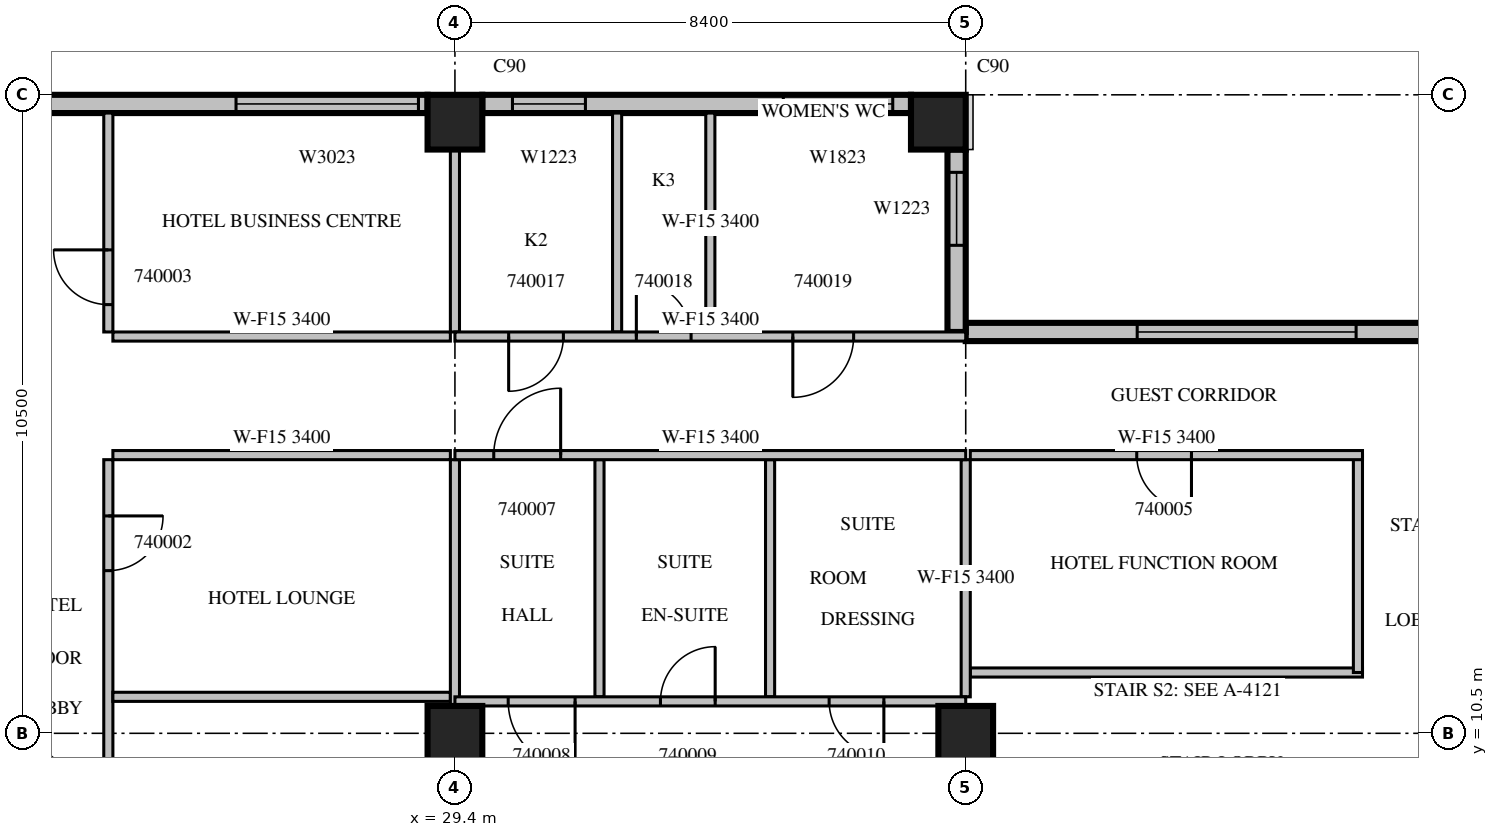
"""IFC4 building model, lengths in metres.
Left out: names, types, materials, properties, quantities, classifications, styles, units other than length and angle.
Written with IfcOpenShell. Run it as: python <this file> out.ifc"""

import sys

from ifc_helpers import new_model, si_unit, direction, frame, frame_2d, origin, origin_2d, place, context, subcontext, project, spatial, rectangle, extrude, source, transform, mapped, element, fill, save


model = new_model("IFC4")
c1 = context("Model", 3, precision=1e-05, world=origin(), true_north=direction((0.0, 1.0)))
c2 = subcontext(c1, "Body", "Model", "MODEL_VIEW")
j1 = project(units=[si_unit("LENGTHUNIT", "METRE"), si_unit("PLANEANGLEUNIT", "RADIAN")], contexts=[c1])
p1 = place(None, origin())
s1 = spatial("IfcSite", under=j1, at=p1, CompositionType="ELEMENT")
p2 = place(p1, origin())
s2 = spatial("IfcBuilding", under=s1, at=p2, CompositionType="ELEMENT")
p3 = place(p2, frame((0.0, 0.0, 185.4)))
s3 = spatial("IfcBuildingStorey", under=s2, at=p3, CompositionType="ELEMENT", Elevation=185.4)
m1 = source(origin(), c2, "Body", "SweptSolid", [
    extrude(rectangle(XDim=0.9, YDim=0.9, at=origin_2d()), origin(), (0.0, 0.0, 1.0), 3.8),
])
for number, where, z_axis, x_axis in (
    (1, (29.4, 10.5, 0.0), (0.0, 0.0, 1.0), (1.0, 0.0, 0.0)),
    (2, (37.8, 10.5, 0.0), (0.0, 0.0, 1.0), (1.0, 0.0, 0.0)),
    (3, (29.4, 20.55, 0.0), (0.0, 0.0, 1.0), (1.0, 0.0, 0.0)),
    (4, (37.35, 20.55, 0.0), (0.0, 0.0, 1.0), (1.0, 0.0, 0.0)),
):
    element("IfcColumn", number, at=place(p3, frame(where, z_axis=z_axis, x_axis=x_axis)), inside=s3, PredefinedType="COLUMN", context=c2, shape_type="MappedRepresentation", body=[
        mapped(m1, transform((0.0, 0.0, 0.0), scale=1.0)),
    ])
m2 = source(origin(), c2, "Body", "SweptSolid", [
    extrude(rectangle(XDim=21.84, YDim=0.3, at=frame_2d((10.92, 0.0))), origin(), (0.0, 0.0, 1.0), 3.4),
])
p4 = place(p3, frame((59.64, 17.1, 0.0), z_axis=(0.0, 0.0, 1.0), x_axis=(-1.0, 0.0, 0.0)))
e5 = element("IfcWall", 5, at=p4, inside=s3, PredefinedType="STANDARD", context=c2, shape_type="MappedRepresentation", body=[
    mapped(m2, transform((0.0, 0.0, 0.0), scale=1.0)),
])
m3 = source(origin(), c2, "Body", "SweptSolid", [
    extrude(rectangle(XDim=3.0, YDim=2.3, at=frame_2d((1.5, 1.15))), frame((0.0, 0.16, 0.0), z_axis=(0.0, -1.0, 0.0), x_axis=(1.0, 0.0, 0.0)), (0.0, 0.0, 1.0), 0.32),
])
p5 = place(p4, frame((0.6, 0.0, 0.6)))
e6 = element("IfcOpeningElement", 6, at=p5, cuts=e5, PredefinedType="OPENING", context=c2, shape_type="MappedRepresentation", body=[
    mapped(m3, transform((0.0, 0.0, 0.0), scale=1.0)),
])
p6 = place(p4, frame((4.8, 0.0, 0.6)))
e7 = element("IfcOpeningElement", 7, at=p6, cuts=e5, PredefinedType="OPENING", context=c2, shape_type="MappedRepresentation", body=[
    mapped(m3, transform((0.0, 0.0, 0.0), scale=1.0)),
])
m4 = source(origin(), c2, "Body", "SweptSolid", [
    extrude(rectangle(XDim=3.6, YDim=2.3, at=frame_2d((1.8, 1.15))), frame((0.0, 0.16, 0.0), z_axis=(0.0, -1.0, 0.0), x_axis=(1.0, 0.0, 0.0)), (0.0, 0.0, 1.0), 0.32),
])
p7 = place(p4, frame((9.54, 0.0, 0.6)))
e8 = element("IfcOpeningElement", 8, at=p7, cuts=e5, PredefinedType="OPENING", context=c2, shape_type="MappedRepresentation", body=[
    mapped(m4, transform((0.0, 0.0, 0.0), scale=1.0)),
])
p8 = place(p4, frame((15.42, 0.0, 0.6)))
e9 = element("IfcOpeningElement", 9, at=p8, cuts=e5, PredefinedType="OPENING", context=c2, shape_type="MappedRepresentation", body=[
    mapped(m4, transform((0.0, 0.0, 0.0), scale=1.0)),
])
m5 = source(origin(), c2, "Body", "SweptSolid", [
    extrude(rectangle(XDim=3.0, YDim=0.3, at=frame_2d((1.5, 0.0))), origin(), (0.0, 0.0, 1.0), 3.4),
])
p9 = place(p3, frame((37.65, 17.1, 0.0), z_axis=(0.0, 0.0, 1.0), x_axis=(0.0, 1.0, 0.0)))
e10 = element("IfcWall", 10, at=p9, inside=s3, PredefinedType="STANDARD", context=c2, shape_type="MappedRepresentation", body=[
    mapped(m5, transform((0.0, 0.0, 0.0), scale=1.0)),
])
m6 = source(origin(), c2, "Body", "SweptSolid", [
    extrude(rectangle(XDim=1.2, YDim=2.3, at=frame_2d((0.6, 1.15))), frame((0.0, 0.16, 0.0), z_axis=(0.0, -1.0, 0.0), x_axis=(1.0, 0.0, 0.0)), (0.0, 0.0, 1.0), 0.32),
])
p10 = place(p9, frame((1.425, 0.0, 0.6)))
e11 = element("IfcOpeningElement", 11, at=p10, cuts=e10, PredefinedType="OPENING", context=c2, shape_type="MappedRepresentation", body=[
    mapped(m6, transform((0.0, 0.0, 0.0), scale=1.0)),
])
m7 = source(origin(), c2, "Body", "SweptSolid", [
    extrude(rectangle(XDim=7.05, YDim=0.3, at=frame_2d((3.525, 0.0))), origin(), (0.0, 0.0, 1.0), 3.4),
])
p11 = place(p3, frame((36.9, 20.85, 0.0), z_axis=(0.0, 0.0, 1.0), x_axis=(-1.0, 0.0, 0.0)))
e12 = element("IfcWall", 12, at=p11, inside=s3, PredefinedType="STANDARD", context=c2, shape_type="MappedRepresentation", body=[
    mapped(m7, transform((0.0, 0.0, 0.0), scale=1.0)),
])
m8 = source(origin(), c2, "Body", "SweptSolid", [
    extrude(rectangle(XDim=1.8, YDim=2.3, at=frame_2d((0.9, 1.15))), frame((0.0, 0.16, 0.0), z_axis=(0.0, -1.0, 0.0), x_axis=(1.0, 0.0, 0.0)), (0.0, 0.0, 1.0), 0.32),
])
p12 = place(p11, frame((0.3, 0.0, 0.6)))
e13 = element("IfcOpeningElement", 13, at=p12, cuts=e12, PredefinedType="OPENING", context=c2, shape_type="MappedRepresentation", body=[
    mapped(m8, transform((0.0, 0.0, 0.0), scale=1.0)),
])
p13 = place(p11, frame((5.354, 0.0, 0.6)))
e14 = element("IfcOpeningElement", 14, at=p13, cuts=e12, PredefinedType="OPENING", context=c2, shape_type="MappedRepresentation", body=[
    mapped(m6, transform((0.0, 0.0, 0.0), scale=1.0)),
])
m9 = source(origin(), c2, "Body", "SweptSolid", [
    extrude(rectangle(XDim=7.15, YDim=0.3, at=frame_2d((3.575, 0.0))), origin(), (0.0, 0.0, 1.0), 3.4),
])
p14 = place(p3, frame((28.95, 20.85, 0.0), z_axis=(0.0, 0.0, 1.0), x_axis=(-1.0, 0.0, 0.0)))
e15 = element("IfcWall", 15, at=p14, inside=s3, PredefinedType="STANDARD", context=c2, shape_type="MappedRepresentation", body=[
    mapped(m9, transform((0.0, 0.0, 0.0), scale=1.0)),
])
p15 = place(p14, frame((0.15, 0.0, 0.6)))
e16 = element("IfcOpeningElement", 16, at=p15, cuts=e15, PredefinedType="OPENING", context=c2, shape_type="MappedRepresentation", body=[
    mapped(m3, transform((0.0, 0.0, 0.0), scale=1.0)),
])
m10 = source(origin(), c2, "Body", "SweptSolid", [
    extrude(rectangle(XDim=11.525, YDim=0.15, at=frame_2d((5.763, 0.0))), origin(), (0.0, 0.0, 1.0), 3.4),
])
p16 = place(p3, frame((23.7, 15.0, 0.0), z_axis=(0.0, 0.0, 1.0), x_axis=(0.0, -1.0, 0.0)))
e17 = element("IfcWall", 17, at=p16, inside=s3, PredefinedType="PARTITIONING", context=c2, shape_type="MappedRepresentation", body=[
    mapped(m10, transform((0.0, 0.0, 0.0), scale=1.0)),
])
m11 = source(origin(), c2, "Body", "SweptSolid", [
    extrude(rectangle(XDim=0.9, YDim=2.1, at=frame_2d((0.45, 1.05))), frame((0.0, 0.085, 0.0), z_axis=(0.0, -1.0, 0.0), x_axis=(1.0, 0.0, 0.0)), (0.0, 0.0, 1.0), 0.17),
])
p17 = place(p16, frame((7.562, 0.0, 0.0)))
e18 = element("IfcOpeningElement", 18, at=p17, cuts=e17, PredefinedType="OPENING", context=c2, shape_type="MappedRepresentation", body=[
    mapped(m11, transform((0.0, 0.0, 0.0), scale=1.0)),
])
p18 = place(p16, frame((0.925, 0.0, 0.0)))
e19 = element("IfcOpeningElement", 19, at=p18, cuts=e17, PredefinedType="OPENING", context=c2, shape_type="MappedRepresentation", body=[
    mapped(m11, transform((0.0, 0.0, 0.0), scale=1.0)),
])
m12 = source(origin(), c2, "Body", "SweptSolid", [
    extrude(rectangle(XDim=3.6, YDim=0.15, at=frame_2d((1.8, 0.0))), origin(), (0.0, 0.0, 1.0), 3.4),
])
p19 = place(p3, frame((23.7, 20.7, 0.0), z_axis=(0.0, 0.0, 1.0), x_axis=(0.0, -1.0, 0.0)))
e20 = element("IfcWall", 20, at=p19, inside=s3, PredefinedType="PARTITIONING", context=c2, shape_type="MappedRepresentation", body=[
    mapped(m12, transform((0.0, 0.0, 0.0), scale=1.0)),
])
p20 = place(p19, frame((2.25, 0.0, 0.0)))
e21 = element("IfcOpeningElement", 21, at=p20, cuts=e20, PredefinedType="OPENING", context=c2, shape_type="MappedRepresentation", body=[
    mapped(m11, transform((0.0, 0.0, 0.0), scale=1.0)),
])
m13 = source(origin(), c2, "Body", "SweptSolid", [
    extrude(rectangle(XDim=5.55, YDim=0.15, at=frame_2d((2.775, 0.0))), origin(), (0.0, 0.0, 1.0), 3.4),
])
for number, where, z_axis, x_axis in (
    (22, (29.325, 11.1, 0.0), (0.0, 0.0, 1.0), (-1.0, 0.0, 0.0)),
    (23, (29.325, 15.075, 0.0), (0.0, 0.0, 1.0), (-1.0, 0.0, 0.0)),
    (24, (23.775, 17.025, 0.0), (0.0, 0.0, 1.0), (1.0, 0.0, 0.0)),
):
    element("IfcWall", number, at=place(p3, frame(where, z_axis=z_axis, x_axis=x_axis)), inside=s3, PredefinedType="PARTITIONING", context=c2, shape_type="MappedRepresentation", body=[
        mapped(m13, transform((0.0, 0.0, 0.0), scale=1.0)),
    ])
m14 = source(origin(), c2, "Body", "SweptSolid", [
    extrude(rectangle(XDim=4.051, YDim=0.15, at=frame_2d((2.026, 0.0))), origin(), (0.0, 0.0, 1.0), 3.4),
])
p21 = place(p3, frame((29.4, 10.949, 0.0), z_axis=(0.0, 0.0, 1.0), x_axis=(0.0, 1.0, 0.0)))
e25 = element("IfcWall", 25, at=p21, inside=s3, PredefinedType="PARTITIONING", context=c2, shape_type="MappedRepresentation", body=[
    mapped(m14, transform((0.0, 0.0, 0.0), scale=1.0)),
])
m15 = source(origin(), c2, "Body", "SweptSolid", [
    extrude(rectangle(XDim=3.001, YDim=0.15, at=frame_2d((1.5, 0.0))), origin(), (0.0, 0.0, 1.0), 3.4),
])
p22 = place(p3, frame((29.4, 17.1, 0.0), z_axis=(0.0, 0.0, 1.0), x_axis=(0.0, 1.0, 0.0)))
e26 = element("IfcWall", 26, at=p22, inside=s3, PredefinedType="PARTITIONING", context=c2, shape_type="MappedRepresentation", body=[
    mapped(m15, transform((0.0, 0.0, 0.0), scale=1.0)),
])
m16 = source(origin(), c2, "Body", "SweptSolid", [
    extrude(rectangle(XDim=6.45, YDim=0.15, at=frame_2d((3.225, 0.0))), origin(), (0.0, 0.0, 1.0), 3.4),
])
p23 = place(p3, frame((37.875, 11.5, 0.0), z_axis=(0.0, 0.0, 1.0), x_axis=(1.0, 0.0, 0.0)))
e27 = element("IfcWall", 27, at=p23, inside=s3, PredefinedType="PARTITIONING", context=c2, shape_type="MappedRepresentation", body=[
    mapped(m16, transform((0.0, 0.0, 0.0), scale=1.0)),
])
m17 = source(origin(), c2, "Body", "SweptSolid", [
    extrude(rectangle(XDim=3.575, YDim=0.15, at=frame_2d((1.788, 0.0))), origin(), (0.0, 0.0, 1.0), 3.4),
])
p24 = place(p3, frame((44.25, 11.5, 0.0), z_axis=(0.0, 0.0, 1.0), x_axis=(0.0, 1.0, 0.0)))
e28 = element("IfcWall", 28, at=p24, inside=s3, PredefinedType="PARTITIONING", context=c2, shape_type="MappedRepresentation", body=[
    mapped(m17, transform((0.0, 0.0, 0.0), scale=1.0)),
])
p25 = place(p3, frame((44.325, 15.075, 0.0), z_axis=(0.0, 0.0, 1.0), x_axis=(-1.0, 0.0, 0.0)))
e29 = element("IfcWall", 29, at=p25, inside=s3, PredefinedType="PARTITIONING", context=c2, shape_type="MappedRepresentation", body=[
    mapped(m16, transform((0.0, 0.0, 0.0), scale=1.0)),
])
p26 = place(p25, frame((2.812, 0.0, 0.0)))
e30 = element("IfcOpeningElement", 30, at=p26, cuts=e29, PredefinedType="OPENING", context=c2, shape_type="MappedRepresentation", body=[
    mapped(m11, transform((0.0, 0.0, 0.0), scale=1.0)),
])
m18 = source(origin(), c2, "Body", "SweptSolid", [
    extrude(rectangle(XDim=3.9, YDim=0.15, at=frame_2d((1.95, 0.0))), origin(), (0.0, 0.0, 1.0), 3.4),
])
for number, where, z_axis, x_axis in (
    (31, (31.777, 11.1, 0.0), (0.0, 0.0, 1.0), (0.0, 1.0, 0.0)),
    (32, (34.583, 11.1, 0.0), (0.0, 0.0, 1.0), (0.0, 1.0, 0.0)),
    (33, (37.8, 11.1, 0.0), (0.0, 0.0, 1.0), (0.0, 1.0, 0.0)),
):
    element("IfcWall", number, at=place(p3, frame(where, z_axis=z_axis, x_axis=x_axis)), inside=s3, PredefinedType="PARTITIONING", context=c2, shape_type="MappedRepresentation", body=[
        mapped(m18, transform((0.0, 0.0, 0.0), scale=1.0)),
    ])
m19 = source(origin(), c2, "Body", "SweptSolid", [
    extrude(rectangle(XDim=8.4, YDim=0.15, at=frame_2d((4.2, 0.0))), origin(), (0.0, 0.0, 1.0), 3.4),
])
p27 = place(p3, frame((37.8, 11.025, 0.0), z_axis=(0.0, 0.0, 1.0), x_axis=(-1.0, 0.0, 0.0)))
e34 = element("IfcWall", 34, at=p27, inside=s3, PredefinedType="PARTITIONING", context=c2, shape_type="MappedRepresentation", body=[
    mapped(m19, transform((0.0, 0.0, 0.0), scale=1.0)),
])
m20 = source(origin(), c2, "Body", "SweptSolid", [
    extrude(rectangle(XDim=1.1, YDim=2.1, at=frame_2d((0.55, 1.05))), frame((0.0, 0.085, 0.0), z_axis=(0.0, -1.0, 0.0), x_axis=(1.0, 0.0, 0.0)), (0.0, 0.0, 1.0), 0.17),
])
p28 = place(p27, frame((6.424, 0.0, 0.0)))
e35 = element("IfcOpeningElement", 35, at=p28, cuts=e34, PredefinedType="OPENING", context=c2, shape_type="MappedRepresentation", body=[
    mapped(m20, transform((0.0, 0.0, 0.0), scale=1.0)),
])
p29 = place(p27, frame((4.12, 0.0, 0.0)))
e36 = element("IfcOpeningElement", 36, at=p29, cuts=e34, PredefinedType="OPENING", context=c2, shape_type="MappedRepresentation", body=[
    mapped(m11, transform((0.0, 0.0, 0.0), scale=1.0)),
])
p30 = place(p27, frame((1.346, 0.0, 0.0)))
e37 = element("IfcOpeningElement", 37, at=p30, cuts=e34, PredefinedType="OPENING", context=c2, shape_type="MappedRepresentation", body=[
    mapped(m11, transform((0.0, 0.0, 0.0), scale=1.0)),
])
for number, where, z_axis, x_axis in (
    (38, (32.067, 20.7, 0.0), (0.0, 0.0, 1.0), (0.0, -1.0, 0.0)),
    (39, (33.6, 17.1, 0.0), (0.0, 0.0, 1.0), (0.0, 1.0, 0.0)),
):
    element("IfcWall", number, at=place(p3, frame(where, z_axis=z_axis, x_axis=x_axis)), inside=s3, PredefinedType="PARTITIONING", context=c2, shape_type="MappedRepresentation", body=[
        mapped(m12, transform((0.0, 0.0, 0.0), scale=1.0)),
    ])
p31 = place(p3, frame((37.8, 15.075, 0.0), z_axis=(0.0, 0.0, 1.0), x_axis=(-1.0, 0.0, 0.0)))
e40 = element("IfcWall", 40, at=p31, inside=s3, PredefinedType="PARTITIONING", context=c2, shape_type="MappedRepresentation", body=[
    mapped(m19, transform((0.0, 0.0, 0.0), scale=1.0)),
])
p32 = place(p31, frame((6.662, 0.0, 0.0)))
e41 = element("IfcOpeningElement", 41, at=p32, cuts=e40, PredefinedType="OPENING", context=c2, shape_type="MappedRepresentation", body=[
    mapped(m20, transform((0.0, 0.0, 0.0), scale=1.0)),
])
p33 = place(p3, frame((29.4, 17.025, 0.0), z_axis=(0.0, 0.0, 1.0), x_axis=(1.0, 0.0, 0.0)))
e42 = element("IfcWall", 42, at=p33, inside=s3, PredefinedType="PARTITIONING", context=c2, shape_type="MappedRepresentation", body=[
    mapped(m19, transform((0.0, 0.0, 0.0), scale=1.0)),
])
p34 = place(p33, frame((0.883, 0.0, 0.0)))
e43 = element("IfcOpeningElement", 43, at=p34, cuts=e42, PredefinedType="OPENING", context=c2, shape_type="MappedRepresentation", body=[
    mapped(m11, transform((0.0, 0.0, 0.0), scale=1.0)),
])
p35 = place(p33, frame((2.983, 0.0, 0.0)))
e44 = element("IfcOpeningElement", 44, at=p35, cuts=e42, PredefinedType="OPENING", context=c2, shape_type="MappedRepresentation", body=[
    mapped(m11, transform((0.0, 0.0, 0.0), scale=1.0)),
])
m21 = source(origin(), c2, "Body", "SweptSolid", [
    extrude(rectangle(XDim=1.0, YDim=2.1, at=frame_2d((0.5, 1.05))), frame((0.0, 0.085, 0.0), z_axis=(0.0, -1.0, 0.0), x_axis=(1.0, 0.0, 0.0)), (0.0, 0.0, 1.0), 0.17),
])
p36 = place(p33, frame((5.557, 0.0, 0.0)))
e45 = element("IfcOpeningElement", 45, at=p36, cuts=e42, PredefinedType="OPENING", context=c2, shape_type="MappedRepresentation", body=[
    mapped(m21, transform((0.0, 0.0, 0.0), scale=1.0)),
])
m22 = source(origin(), c2, "Body", "SweptSolid", [
    extrude(rectangle(XDim=3.6, YDim=2.3, at=frame_2d((1.8, 1.15))), frame((0.0, 0.03, 0.0), z_axis=(0.0, -1.0, 0.0), x_axis=(1.0, 0.0, 0.0)), (0.0, 0.0, 1.0), 0.06),
])
p37 = place(p8, origin())
e46 = element("IfcWindow", 46, at=p37, inside=s3, PartitioningType="SINGLE_PANEL", PredefinedType="WINDOW", context=c2, shape_type="MappedRepresentation", body=[
    mapped(m22, transform((0.0, 0.0, 0.0), scale=1.0)),
])
fill(e9, e46)
m23 = source(origin(), c2, "Body", "SweptSolid", [
    extrude(rectangle(XDim=1.2, YDim=2.3, at=frame_2d((0.6, 1.15))), frame((0.0, 0.03, 0.0), z_axis=(0.0, -1.0, 0.0), x_axis=(1.0, 0.0, 0.0)), (0.0, 0.0, 1.0), 0.06),
])
p38 = place(p10, origin())
e47 = element("IfcWindow", 47, at=p38, inside=s3, PartitioningType="SINGLE_PANEL", PredefinedType="WINDOW", context=c2, shape_type="MappedRepresentation", body=[
    mapped(m23, transform((0.0, 0.0, 0.0), scale=1.0)),
])
fill(e11, e47)
m24 = source(origin(), c2, "Body", "SweptSolid", [
    extrude(rectangle(XDim=1.8, YDim=2.3, at=frame_2d((0.9, 1.15))), frame((0.0, 0.03, 0.0), z_axis=(0.0, -1.0, 0.0), x_axis=(1.0, 0.0, 0.0)), (0.0, 0.0, 1.0), 0.06),
])
p39 = place(p12, origin())
e48 = element("IfcWindow", 48, at=p39, inside=s3, PartitioningType="SINGLE_PANEL", PredefinedType="WINDOW", context=c2, shape_type="MappedRepresentation", body=[
    mapped(m24, transform((0.0, 0.0, 0.0), scale=1.0)),
])
fill(e13, e48)
p40 = place(p13, origin())
e49 = element("IfcWindow", 49, at=p40, inside=s3, PartitioningType="SINGLE_PANEL", PredefinedType="WINDOW", context=c2, shape_type="MappedRepresentation", body=[
    mapped(m23, transform((0.0, 0.0, 0.0), scale=1.0)),
])
fill(e14, e49)
m25 = source(origin(), c2, "Body", "SweptSolid", [
    extrude(rectangle(XDim=3.0, YDim=2.3, at=frame_2d((1.5, 1.15))), frame((0.0, 0.03, 0.0), z_axis=(0.0, -1.0, 0.0), x_axis=(1.0, 0.0, 0.0)), (0.0, 0.0, 1.0), 0.06),
])
p41 = place(p15, origin())
e50 = element("IfcWindow", 50, at=p41, inside=s3, PartitioningType="SINGLE_PANEL", PredefinedType="WINDOW", context=c2, shape_type="MappedRepresentation", body=[
    mapped(m25, transform((0.0, 0.0, 0.0), scale=1.0)),
])
fill(e16, e50)
m26 = source(origin(), c2, "Body", "SweptSolid", [
    extrude(rectangle(XDim=0.9, YDim=2.1, at=frame_2d((0.45, 1.05))), frame((0.0, 0.025, 0.0), z_axis=(0.0, -1.0, 0.0), x_axis=(1.0, 0.0, 0.0)), (0.0, 0.0, 1.0), 0.05),
])
p42 = place(p18, origin())
e51 = element("IfcDoor", 51, at=p42, inside=s3, OperationType="SINGLE_SWING_LEFT", PredefinedType="DOOR", context=c2, shape_type="MappedRepresentation", body=[
    mapped(m26, transform((0.0, 0.0, 0.0), scale=1.0)),
])
fill(e19, e51)
p43 = place(p20, origin())
e52 = element("IfcDoor", 52, at=p43, inside=s3, OperationType="SINGLE_SWING_RIGHT", PredefinedType="DOOR", context=c2, shape_type="MappedRepresentation", body=[
    mapped(m26, transform((0.0, 0.0, 0.0), scale=1.0)),
])
fill(e21, e52)
p44 = place(p26, origin())
e53 = element("IfcDoor", 53, at=p44, inside=s3, OperationType="SINGLE_SWING_LEFT", PredefinedType="DOOR", context=c2, shape_type="MappedRepresentation", body=[
    mapped(m26, transform((0.0, 0.0, 0.0), scale=1.0)),
])
fill(e30, e53)
m27 = source(origin(), c2, "Body", "SweptSolid", [
    extrude(rectangle(XDim=1.1, YDim=2.1, at=frame_2d((0.55, 1.05))), frame((0.0, 0.025, 0.0), z_axis=(0.0, -1.0, 0.0), x_axis=(1.0, 0.0, 0.0)), (0.0, 0.0, 1.0), 0.05),
])
p45 = place(p32, origin())
e54 = element("IfcDoor", 54, at=p45, inside=s3, OperationType="SINGLE_SWING_RIGHT", PredefinedType="DOOR", context=c2, shape_type="MappedRepresentation", body=[
    mapped(m27, transform((0.0, 0.0, 0.0), scale=1.0)),
])
fill(e41, e54)
p46 = place(p28, origin())
e55 = element("IfcDoor", 55, at=p46, inside=s3, OperationType="SINGLE_SWING_LEFT", PredefinedType="DOOR", context=c2, shape_type="MappedRepresentation", body=[
    mapped(m27, transform((0.0, 0.0, 0.0), scale=1.0)),
])
fill(e35, e55)
p47 = place(p29, origin())
e56 = element("IfcDoor", 56, at=p47, inside=s3, OperationType="SINGLE_SWING_RIGHT", PredefinedType="DOOR", context=c2, shape_type="MappedRepresentation", body=[
    mapped(m26, transform((0.0, 0.0, 0.0), scale=1.0)),
])
fill(e36, e56)
p48 = place(p30, origin())
e57 = element("IfcDoor", 57, at=p48, inside=s3, OperationType="SINGLE_SWING_LEFT", PredefinedType="DOOR", context=c2, shape_type="MappedRepresentation", body=[
    mapped(m26, transform((0.0, 0.0, 0.0), scale=1.0)),
])
fill(e37, e57)
p49 = place(p34, origin())
e58 = element("IfcDoor", 58, at=p49, inside=s3, OperationType="SINGLE_SWING_RIGHT", PredefinedType="DOOR", context=c2, shape_type="MappedRepresentation", body=[
    mapped(m26, transform((0.0, 0.0, 0.0), scale=1.0)),
])
fill(e43, e58)
p50 = place(p35, origin())
e59 = element("IfcDoor", 59, at=p50, inside=s3, OperationType="SINGLE_SWING_LEFT", PredefinedType="DOOR", context=c2, shape_type="MappedRepresentation", body=[
    mapped(m26, transform((0.0, 0.0, 0.0), scale=1.0)),
])
fill(e44, e59)
m28 = source(origin(), c2, "Body", "SweptSolid", [
    extrude(rectangle(XDim=1.0, YDim=2.1, at=frame_2d((0.5, 1.05))), frame((0.0, 0.025, 0.0), z_axis=(0.0, -1.0, 0.0), x_axis=(1.0, 0.0, 0.0)), (0.0, 0.0, 1.0), 0.05),
])
p51 = place(p36, origin())
e60 = element("IfcDoor", 60, at=p51, inside=s3, OperationType="SINGLE_SWING_RIGHT", PredefinedType="DOOR", context=c2, shape_type="MappedRepresentation", body=[
    mapped(m28, transform((0.0, 0.0, 0.0), scale=1.0)),
])
fill(e45, e60)
save(model, sys.argv[1])
